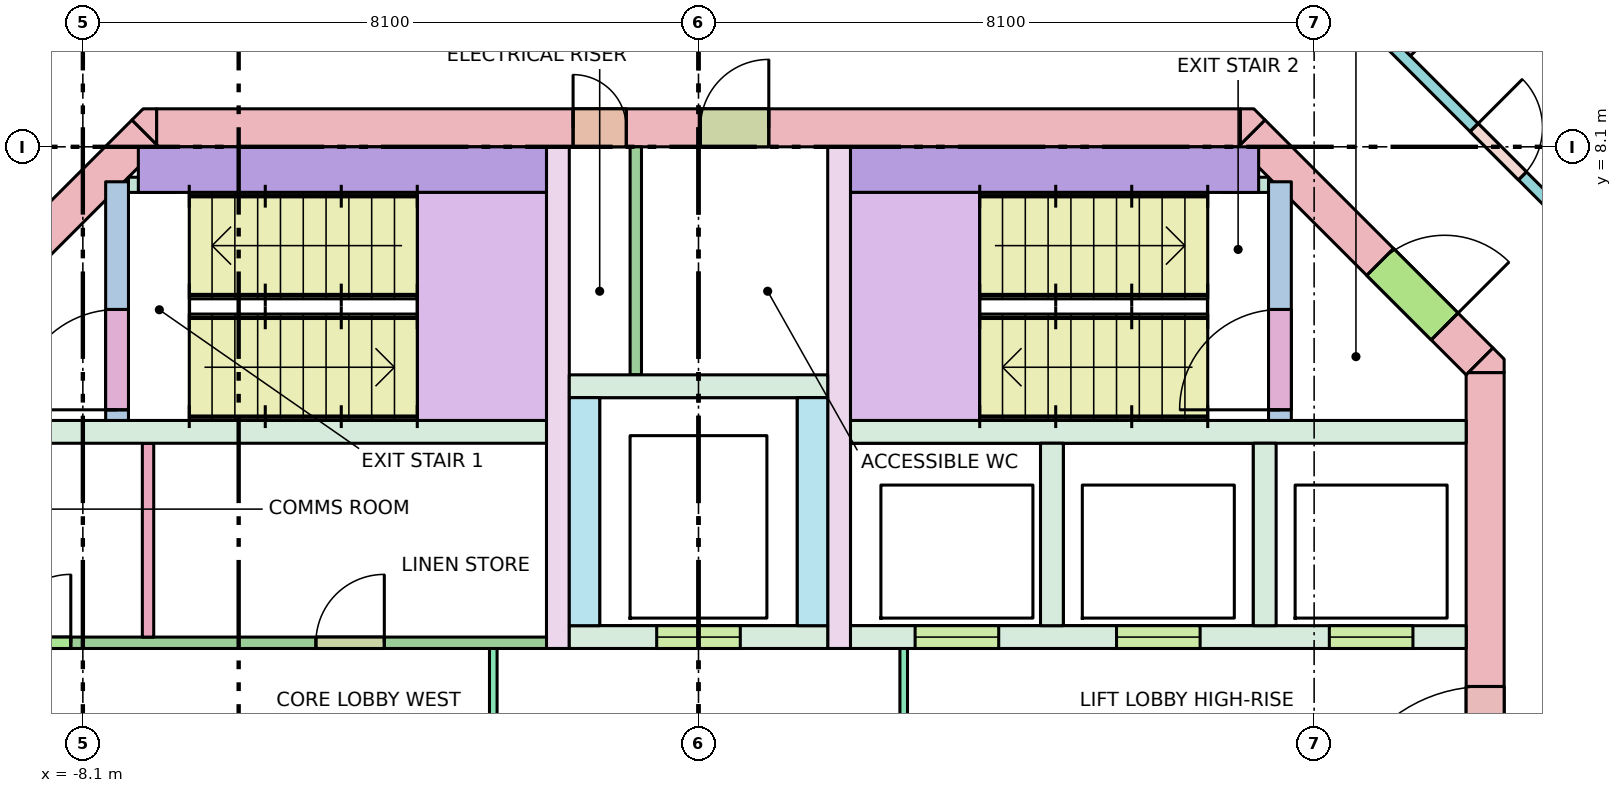
"""IFC4 building model, lengths in metres.
Left out: names, types, materials, properties, quantities, classifications, styles, units other than length and angle.
Written with IfcOpenShell. Run it as: python <this file> out.ifc"""

import sys

from ifc_helpers import new_model, si_unit, direction, frame, frame_2d, origin, place, context, subcontext, project, spatial, polyline, rectangle, outline, extrude, element, fill, save


model = new_model("IFC4")
c1 = context("Model", 3, precision=1e-05, world=origin(), true_north=direction((0.0, 1.0)))
c2 = subcontext(c1, "Body", "Model", "MODEL_VIEW")
j1 = project(units=[si_unit("LENGTHUNIT", "METRE"), si_unit("PLANEANGLEUNIT", "RADIAN")], contexts=[c1])
p1 = place(None, origin())
s1 = spatial("IfcSite", under=j1, at=p1, CompositionType="ELEMENT")
p2 = place(p1, origin())
s2 = spatial("IfcBuilding", under=s1, at=p2, CompositionType="ELEMENT")
p3 = place(p2, frame((0.0, 0.0, 264.9)))
s3 = spatial("IfcBuildingStorey", under=s2, at=p3, CompositionType="ELEMENT", Elevation=264.9)
p4 = place(p3, frame((-7.13, 8.35, -0.28), z_axis=(0.0, 0.0, 1.0), x_axis=(1.0, 0.0, 0.0)))
e1 = element("IfcWall", 1, at=p4, inside=s3, PredefinedType="SHEAR", context=c2, shape_type="SweptSolid", body=[
    extrude(rectangle(XDim=14.26, YDim=0.5, at=frame_2d((7.13, 0.0))), origin(), (0.0, 0.0, 1.0), 3.7),
])
p5 = place(p4, frame((5.48, 0.0, 0.28)))
e2 = element("IfcOpeningElement", 2, at=p5, cuts=e1, PredefinedType="OPENING", context=c2, shape_type="SweptSolid", body=[
    extrude(rectangle(XDim=0.7, YDim=2.1, at=frame_2d((0.35, 1.05))), frame((0.0, 0.26, 0.0), z_axis=(0.0, -1.0, 0.0), x_axis=(1.0, 0.0, 0.0)), (0.0, 0.0, 1.0), 0.52),
])
p6 = place(p4, frame((7.155, 0.0, 0.28)))
e3 = element("IfcOpeningElement", 3, at=p6, cuts=e1, PredefinedType="OPENING", context=c2, shape_type="SweptSolid", body=[
    extrude(rectangle(XDim=0.9, YDim=2.1, at=frame_2d((0.45, 1.05))), frame((0.0, 0.26, 0.0), z_axis=(0.0, -1.0, 0.0), x_axis=(1.0, 0.0, 0.0)), (0.0, 0.0, 1.0), 0.52),
])
p7 = place(p3, frame((10.35, -5.13, -0.28), z_axis=(0.0, 0.0, 1.0), x_axis=(0.0, 1.0, 0.0)))
e4 = element("IfcWall", 4, at=p7, inside=s3, PredefinedType="SHEAR", context=c2, shape_type="SweptSolid", body=[
    extrude(rectangle(XDim=10.26, YDim=0.5, at=frame_2d((5.13, 0.0))), origin(), (0.0, 0.0, 1.0), 3.7),
])
p8 = place(p7, frame((4.13, 0.0, 0.28)))
e5 = element("IfcOpeningElement", 5, at=p8, cuts=e4, PredefinedType="OPENING", context=c2, shape_type="SweptSolid", body=[
    extrude(rectangle(XDim=2.0, YDim=2.1, at=frame_2d((1.0, 1.05))), frame((0.0, 0.26, 0.0), z_axis=(0.0, -1.0, 0.0), x_axis=(1.0, 0.0, 0.0)), (0.0, 0.0, 1.0), 0.52),
])
p9 = place(p3, frame((-10.277, 5.277, -0.28), z_axis=(0.0, 0.0, 1.0), x_axis=(0.707106781187, 0.707106781187, 0.0)))
e6 = element("IfcWall", 6, at=p9, inside=s3, PredefinedType="SHEAR", context=c2, shape_type="SweptSolid", body=[
    extrude(rectangle(XDim=4.243, YDim=0.5, at=frame_2d((2.121, 0.0))), origin(), (0.0, 0.0, 1.0), 3.7),
])
p10 = place(p9, frame((0.65, 0.0, 0.28)))
e7 = element("IfcOpeningElement", 7, at=p10, cuts=e6, PredefinedType="OPENING", context=c2, shape_type="SweptSolid", body=[
    extrude(rectangle(XDim=1.2, YDim=2.1, at=frame_2d((0.6, 1.05))), frame((0.0, 0.26, 0.0), z_axis=(0.0, -1.0, 0.0), x_axis=(1.0, 0.0, 0.0)), (0.0, 0.0, 1.0), 0.52),
])
p11 = place(p3, frame((7.277, 8.277, -0.28), z_axis=(0.0, 0.0, 1.0), x_axis=(0.707106781187, -0.707106781187, 0.0)))
e8 = element("IfcWall", 8, at=p11, inside=s3, PredefinedType="SHEAR", context=c2, shape_type="SweptSolid", body=[
    extrude(rectangle(XDim=4.243, YDim=0.5, at=frame_2d((2.121, 0.0))), origin(), (0.0, 0.0, 1.0), 3.7),
])
p12 = place(p11, frame((2.393, 0.0, 0.28)))
e9 = element("IfcOpeningElement", 9, at=p12, cuts=e8, PredefinedType="OPENING", context=c2, shape_type="SweptSolid", body=[
    extrude(rectangle(XDim=1.2, YDim=2.1, at=frame_2d((0.6, 1.05))), frame((0.0, 0.26, 0.0), z_axis=(0.0, -1.0, 0.0), x_axis=(1.0, 0.0, 0.0)), (0.0, 0.0, 1.0), 0.52),
])
p13 = place(p3, frame((0.0, 0.0, -0.28)))
e10 = element("IfcWall", 10, at=p13, inside=s3, PredefinedType="SHEAR", context=c2, shape_type="SweptSolid", body=[
    extrude(outline(polyline([(10.6, 5.307), (10.6, 5.13), (10.13, 5.13), (10.454, 5.454), (10.6, 5.307)])), origin(), (0.0, 0.0, 1.0), 3.7),
])
p14 = place(p3, frame((0.0, 0.0, -0.28)))
e11 = element("IfcWall", 11, at=p14, inside=s3, PredefinedType="SHEAR", context=c2, shape_type="SweptSolid", body=[
    extrude(outline(polyline([(-7.307, 8.6), (-7.13, 8.6), (-7.13, 8.13), (-7.454, 8.454), (-7.307, 8.6)])), origin(), (0.0, 0.0, 1.0), 3.7),
])
p15 = place(p3, frame((0.0, 0.0, -0.28)))
e12 = element("IfcWall", 12, at=p15, inside=s3, PredefinedType="SHEAR", context=c2, shape_type="SweptSolid", body=[
    extrude(outline(polyline([(7.307, 8.6), (7.454, 8.454), (7.13, 8.13), (7.13, 8.6), (7.307, 8.6)])), origin(), (0.0, 0.0, 1.0), 3.7),
])
for number, where, z_axis, x_axis in (
    (13, (-10.1, 4.35, 0.0), (0.0, 0.0, 1.0), (1.0, 0.0, 0.0)),
    (14, (2.0, 4.35, 0.0), (0.0, 0.0, 1.0), (1.0, 0.0, 0.0)),
):
    element("IfcWall", number, at=place(p3, frame(where, z_axis=z_axis, x_axis=x_axis)), inside=s3, PredefinedType="SOLIDWALL", context=c2, shape_type="SweptSolid", body=[
        extrude(rectangle(XDim=8.1, YDim=0.3, at=frame_2d((4.05, 0.0))), origin(), (0.0, 0.0, 1.0), 3.42),
    ])
p16 = place(p3, frame((2.0, 1.65, 0.0), z_axis=(0.0, 0.0, 1.0), x_axis=(1.0, 0.0, 0.0)))
e15 = element("IfcWall", 15, at=p16, inside=s3, PredefinedType="SOLIDWALL", context=c2, shape_type="SweptSolid", body=[
    extrude(rectangle(XDim=8.1, YDim=0.3, at=frame_2d((4.05, 0.0))), origin(), (0.0, 0.0, 1.0), 3.42),
])
p17 = place(p16, frame((0.85, 0.0, 0.0)))
e16 = element("IfcOpeningElement", 16, at=p17, cuts=e15, PredefinedType="OPENING", context=c2, shape_type="SweptSolid", body=[
    extrude(rectangle(XDim=1.1, YDim=2.1, at=frame_2d((0.55, 1.05))), frame((0.0, 0.16, 0.0), z_axis=(0.0, -1.0, 0.0), x_axis=(1.0, 0.0, 0.0)), (0.0, 0.0, 1.0), 0.32),
])
p18 = place(p16, frame((3.5, 0.0, 0.0)))
e17 = element("IfcOpeningElement", 17, at=p18, cuts=e15, PredefinedType="OPENING", context=c2, shape_type="SweptSolid", body=[
    extrude(rectangle(XDim=1.1, YDim=2.1, at=frame_2d((0.55, 1.05))), frame((0.0, 0.16, 0.0), z_axis=(0.0, -1.0, 0.0), x_axis=(1.0, 0.0, 0.0)), (0.0, 0.0, 1.0), 0.32),
])
p19 = place(p16, frame((6.3, 0.0, 0.0)))
e18 = element("IfcOpeningElement", 18, at=p19, cuts=e15, PredefinedType="OPENING", context=c2, shape_type="SweptSolid", body=[
    extrude(rectangle(XDim=1.1, YDim=2.1, at=frame_2d((0.55, 1.05))), frame((0.0, 0.16, 0.0), z_axis=(0.0, -1.0, 0.0), x_axis=(1.0, 0.0, 0.0)), (0.0, 0.0, 1.0), 0.32),
])
for number, where, z_axis, x_axis in (
    (19, (4.65, 1.8, 0.0), (0.0, 0.0, 1.0), (0.0, 1.0, 0.0)),
    (20, (7.45, 1.8, 0.0), (0.0, 0.0, 1.0), (0.0, 1.0, 0.0)),
):
    element("IfcWall", number, at=place(p3, frame(where, z_axis=z_axis, x_axis=x_axis)), inside=s3, PredefinedType="SOLIDWALL", context=c2, shape_type="SweptSolid", body=[
        extrude(rectangle(XDim=2.4, YDim=0.3, at=frame_2d((1.2, 0.0))), origin(), (0.0, 0.0, 1.0), 3.42),
    ])
for number, where, z_axis, x_axis in (
    (21, (-1.85, 1.5, 0.0), (0.0, 0.0, 1.0), (0.0, 1.0, 0.0)),
    (22, (1.85, 1.5, 0.0), (0.0, 0.0, 1.0), (0.0, 1.0, 0.0)),
):
    element("IfcWall", number, at=place(p3, frame(where, z_axis=z_axis, x_axis=x_axis)), inside=s3, PredefinedType="SHEAR", context=c2, shape_type="SweptSolid", body=[
        extrude(rectangle(XDim=6.6, YDim=0.3, at=frame_2d((3.3, 0.0))), origin(), (0.0, 0.0, 1.0), 3.42),
    ])
p20 = place(p3, frame((-1.7, 1.65, 0.0), z_axis=(0.0, 0.0, 1.0), x_axis=(1.0, 0.0, 0.0)))
e23 = element("IfcWall", 23, at=p20, inside=s3, PredefinedType="SOLIDWALL", context=c2, shape_type="SweptSolid", body=[
    extrude(rectangle(XDim=3.4, YDim=0.3, at=frame_2d((1.7, 0.0))), origin(), (0.0, 0.0, 1.0), 3.42),
])
p21 = place(p20, frame((1.15, 0.0, 0.0)))
e24 = element("IfcOpeningElement", 24, at=p21, cuts=e23, PredefinedType="OPENING", context=c2, shape_type="SweptSolid", body=[
    extrude(rectangle(XDim=1.1, YDim=2.1, at=frame_2d((0.55, 1.05))), frame((0.0, 0.16, 0.0), z_axis=(0.0, -1.0, 0.0), x_axis=(1.0, 0.0, 0.0)), (0.0, 0.0, 1.0), 0.32),
])
for number, where, z_axis, x_axis in (
    (25, (-1.5, 1.8, 0.0), (0.0, 0.0, 1.0), (0.0, 1.0, 0.0)),
    (26, (1.5, 1.8, 0.0), (0.0, 0.0, 1.0), (0.0, 1.0, 0.0)),
):
    element("IfcWall", number, at=place(p3, frame(where, z_axis=z_axis, x_axis=x_axis)), inside=s3, PredefinedType="SOLIDWALL", context=c2, shape_type="SweptSolid", body=[
        extrude(rectangle(XDim=3.0, YDim=0.4, at=frame_2d((1.5, 0.0))), origin(), (0.0, 0.0, 1.0), 3.42),
    ])
p22 = place(p3, frame((-1.7, 4.95, 0.0), z_axis=(0.0, 0.0, 1.0), x_axis=(1.0, 0.0, 0.0)))
e27 = element("IfcWall", 27, at=p22, inside=s3, PredefinedType="SOLIDWALL", context=c2, shape_type="SweptSolid", body=[
    extrude(rectangle(XDim=3.4, YDim=0.3, at=frame_2d((1.7, 0.0))), origin(), (0.0, 0.0, 1.0), 3.42),
])
p23 = place(p3, frame((-7.65, 4.5, 0.0), z_axis=(0.0, 0.0, 1.0), x_axis=(0.0, 1.0, 0.0)))
e28 = element("IfcWall", 28, at=p23, inside=s3, PredefinedType="SHEAR", context=c2, shape_type="SweptSolid", body=[
    extrude(rectangle(XDim=3.14, YDim=0.3, at=frame_2d((1.57, 0.0))), origin(), (0.0, 0.0, 1.0), 3.42),
])
p24 = place(p23, frame((0.14, 0.0, 0.0)))
e29 = element("IfcOpeningElement", 29, at=p24, cuts=e28, PredefinedType="OPENING", context=c2, shape_type="SweptSolid", body=[
    extrude(rectangle(XDim=1.32, YDim=2.1, at=frame_2d((0.66, 1.05))), frame((0.0, 0.16, 0.0), z_axis=(0.0, -1.0, 0.0), x_axis=(1.0, 0.0, 0.0)), (0.0, 0.0, 1.0), 0.32),
])
p25 = place(p3, frame((-7.37, 7.8, 0.0), z_axis=(0.0, 0.0, 1.0), x_axis=(1.0, 0.0, 0.0)))
e30 = element("IfcWall", 30, at=p25, inside=s3, PredefinedType="SHEAR", context=c2, shape_type="SweptSolid", body=[
    extrude(rectangle(XDim=5.37, YDim=0.6, at=frame_2d((2.685, 0.0))), origin(), (0.0, 0.0, 1.0), 3.42),
])
p26 = place(p3, frame((7.65, 4.5, 0.0), z_axis=(0.0, 0.0, 1.0), x_axis=(0.0, 1.0, 0.0)))
e31 = element("IfcWall", 31, at=p26, inside=s3, PredefinedType="SHEAR", context=c2, shape_type="SweptSolid", body=[
    extrude(rectangle(XDim=3.14, YDim=0.3, at=frame_2d((1.57, 0.0))), origin(), (0.0, 0.0, 1.0), 3.42),
])
p27 = place(p26, frame((0.14, 0.0, 0.0)))
e32 = element("IfcOpeningElement", 32, at=p27, cuts=e31, PredefinedType="OPENING", context=c2, shape_type="SweptSolid", body=[
    extrude(rectangle(XDim=1.32, YDim=2.1, at=frame_2d((0.66, 1.05))), frame((0.0, 0.16, 0.0), z_axis=(0.0, -1.0, 0.0), x_axis=(1.0, 0.0, 0.0)), (0.0, 0.0, 1.0), 0.32),
])
p28 = place(p3, frame((2.0, 7.8, 0.0), z_axis=(0.0, 0.0, 1.0), x_axis=(1.0, 0.0, 0.0)))
e33 = element("IfcWall", 33, at=p28, inside=s3, PredefinedType="SHEAR", context=c2, shape_type="SweptSolid", body=[
    extrude(rectangle(XDim=5.37, YDim=0.6, at=frame_2d((2.685, 0.0))), origin(), (0.0, 0.0, 1.0), 3.42),
])
for number, where, z_axis, x_axis in (
    (34, (-7.5, 7.6, 0.0), (0.0, 0.0, 1.0), (1.0, 0.0, 0.0)),
    (35, (6.9, 7.6, 0.0), (0.0, 0.0, 1.0), (1.0, 0.0, 0.0)),
):
    element("IfcWall", number, at=place(p3, frame(where, z_axis=z_axis, x_axis=x_axis)), inside=s3, PredefinedType="SHEAR", context=c2, shape_type="SweptSolid", body=[
        extrude(rectangle(XDim=0.6, YDim=0.2, at=frame_2d((0.3, 0.0))), origin(), (0.0, 0.0, 1.0), 3.42),
    ])
p29 = place(p3, frame((-2.7, -1.5, 0.0), z_axis=(0.0, 0.0, 1.0), x_axis=(0.0, 1.0, 0.0)))
e36 = element("IfcWall", 36, at=p29, inside=s3, PredefinedType="PARTITIONING", context=c2, shape_type="SweptSolid", body=[
    extrude(rectangle(XDim=3.0, YDim=0.1, at=frame_2d((1.5, 0.0))), origin(), (0.0, 0.0, 1.0), 3.42),
])
p30 = place(p29, frame((0.9, 0.0, 0.0)))
e37 = element("IfcOpeningElement", 37, at=p30, cuts=e36, PredefinedType="OPENING", context=c2, shape_type="SweptSolid", body=[
    extrude(rectangle(XDim=1.2, YDim=2.1, at=frame_2d((0.6, 1.05))), frame((0.0, 0.06, 0.0), z_axis=(0.0, -1.0, 0.0), x_axis=(1.0, 0.0, 0.0)), (0.0, 0.0, 1.0), 0.12),
])
p31 = place(p3, frame((2.7, -1.5, 0.0), z_axis=(0.0, 0.0, 1.0), x_axis=(0.0, 1.0, 0.0)))
e38 = element("IfcWall", 38, at=p31, inside=s3, PredefinedType="PARTITIONING", context=c2, shape_type="SweptSolid", body=[
    extrude(rectangle(XDim=3.0, YDim=0.1, at=frame_2d((1.5, 0.0))), origin(), (0.0, 0.0, 1.0), 3.42),
])
p32 = place(p31, frame((0.9, 0.0, 0.0)))
e39 = element("IfcOpeningElement", 39, at=p32, cuts=e38, PredefinedType="OPENING", context=c2, shape_type="SweptSolid", body=[
    extrude(rectangle(XDim=1.2, YDim=2.1, at=frame_2d((0.6, 1.05))), frame((0.0, 0.06, 0.0), z_axis=(0.0, -1.0, 0.0), x_axis=(1.0, 0.0, 0.0)), (0.0, 0.0, 1.0), 0.12),
])
p33 = place(p3, frame((-0.825, 5.1, 0.0), z_axis=(0.0, 0.0, 1.0), x_axis=(0.0, 1.0, 0.0)))
e40 = element("IfcWall", 40, at=p33, inside=s3, PredefinedType="PARTITIONING", context=c2, shape_type="SweptSolid", body=[
    extrude(rectangle(XDim=3.0, YDim=0.15, at=frame_2d((1.5, 0.0))), origin(), (0.0, 0.0, 1.0), 3.42),
])
p34 = place(p3, frame((-7.242, 1.65, 0.0), z_axis=(0.0, 0.0, 1.0), x_axis=(0.0, 1.0, 0.0)))
e41 = element("IfcWall", 41, at=p34, inside=s3, PredefinedType="PARTITIONING", context=c2, shape_type="SweptSolid", body=[
    extrude(rectangle(XDim=2.55, YDim=0.15, at=frame_2d((1.275, 0.0))), origin(), (0.0, 0.0, 1.0), 3.42),
])
p35 = place(p3, frame((-10.1, 1.575, 0.0), z_axis=(0.0, 0.0, 1.0), x_axis=(1.0, 0.0, 0.0)))
e42 = element("IfcWall", 42, at=p35, inside=s3, PredefinedType="PARTITIONING", context=c2, shape_type="SweptSolid", body=[
    extrude(rectangle(XDim=8.1, YDim=0.15, at=frame_2d((4.05, 0.0))), origin(), (0.0, 0.0, 1.0), 3.42),
])
p36 = place(p35, frame((0.941, 0.0, 0.0)))
e43 = element("IfcOpeningElement", 43, at=p36, cuts=e42, PredefinedType="OPENING", context=c2, shape_type="SweptSolid", body=[
    extrude(rectangle(XDim=0.9, YDim=2.1, at=frame_2d((0.45, 1.05))), frame((0.0, 0.085, 0.0), z_axis=(0.0, -1.0, 0.0), x_axis=(1.0, 0.0, 0.0)), (0.0, 0.0, 1.0), 0.17),
])
p37 = place(p35, frame((5.066, 0.0, 0.0)))
e44 = element("IfcOpeningElement", 44, at=p37, cuts=e42, PredefinedType="OPENING", context=c2, shape_type="SweptSolid", body=[
    extrude(rectangle(XDim=0.9, YDim=2.1, at=frame_2d((0.45, 1.05))), frame((0.0, 0.085, 0.0), z_axis=(0.0, -1.0, 0.0), x_axis=(1.0, 0.0, 0.0)), (0.0, 0.0, 1.0), 0.17),
])
p38 = place(p3, frame((-12.438, 6.121, 0.0), z_axis=(0.0, 0.0, 1.0), x_axis=(0.707106781187, 0.707106781187, 0.0)))
e45 = element("IfcWall", 45, at=p38, inside=s3, PredefinedType="PARTITIONING", context=c2, shape_type="SweptSolid", body=[
    extrude(rectangle(XDim=6.105, YDim=0.15, at=frame_2d((3.053, 0.0))), origin(), (0.0, 0.0, 1.0), 2.57),
])
p39 = place(p38, frame((2.602, 0.0, 0.0)))
e46 = element("IfcOpeningElement", 46, at=p39, cuts=e45, PredefinedType="OPENING", context=c2, shape_type="SweptSolid", body=[
    extrude(rectangle(XDim=1.8, YDim=2.1, at=frame_2d((0.9, 1.05))), frame((0.0, 0.085, 0.0), z_axis=(0.0, -1.0, 0.0), x_axis=(1.0, 0.0, 0.0)), (0.0, 0.0, 1.0), 0.17),
])
p40 = place(p3, frame((8.121, 10.438, 0.0), z_axis=(0.0, 0.0, 1.0), x_axis=(0.707106781187, -0.707106781187, 0.0)))
e47 = element("IfcWall", 47, at=p40, inside=s3, PredefinedType="PARTITIONING", context=c2, shape_type="SweptSolid", body=[
    extrude(rectangle(XDim=6.105, YDim=0.15, at=frame_2d((3.053, 0.0))), origin(), (0.0, 0.0, 1.0), 2.57),
])
p41 = place(p40, frame((2.948, 0.0, 0.0)))
e48 = element("IfcOpeningElement", 48, at=p41, cuts=e47, PredefinedType="OPENING", context=c2, shape_type="SweptSolid", body=[
    extrude(rectangle(XDim=0.9, YDim=2.1, at=frame_2d((0.45, 1.05))), frame((0.0, 0.085, 0.0), z_axis=(0.0, -1.0, 0.0), x_axis=(1.0, 0.0, 0.0)), (0.0, 0.0, 1.0), 0.17),
])
p42 = place(p3, frame((9.333, 9.333, 0.0), z_axis=(0.0, 0.0, 1.0), x_axis=(0.707106781187, 0.707106781187, 0.0)))
e49 = element("IfcWall", 49, at=p42, inside=s3, PredefinedType="PARTITIONING", context=c2, shape_type="SweptSolid", body=[
    extrude(rectangle(XDim=7.639, YDim=0.1, at=frame_2d((3.819, 0.0))), origin(), (0.0, 0.0, 1.0), 2.57),
])
p43 = place(p17, origin())
e50 = element("IfcDoor", 50, at=p43, inside=s3, OperationType="DOUBLE_DOOR_SLIDING", PredefinedType="DOOR", context=c2, shape_type="SweptSolid", body=[
    extrude(rectangle(XDim=1.1, YDim=2.1, at=frame_2d((0.55, 1.05))), frame((0.0, 0.025, 0.0), z_axis=(0.0, -1.0, 0.0), x_axis=(1.0, 0.0, 0.0)), (0.0, 0.0, 1.0), 0.05),
])
fill(e16, e50)
p44 = place(p18, origin())
e51 = element("IfcDoor", 51, at=p44, inside=s3, OperationType="DOUBLE_DOOR_SLIDING", PredefinedType="DOOR", context=c2, shape_type="SweptSolid", body=[
    extrude(rectangle(XDim=1.1, YDim=2.1, at=frame_2d((0.55, 1.05))), frame((0.0, 0.025, 0.0), z_axis=(0.0, -1.0, 0.0), x_axis=(1.0, 0.0, 0.0)), (0.0, 0.0, 1.0), 0.05),
])
fill(e17, e51)
p45 = place(p19, origin())
e52 = element("IfcDoor", 52, at=p45, inside=s3, OperationType="DOUBLE_DOOR_SLIDING", PredefinedType="DOOR", context=c2, shape_type="SweptSolid", body=[
    extrude(rectangle(XDim=1.1, YDim=2.1, at=frame_2d((0.55, 1.05))), frame((0.0, 0.025, 0.0), z_axis=(0.0, -1.0, 0.0), x_axis=(1.0, 0.0, 0.0)), (0.0, 0.0, 1.0), 0.05),
])
fill(e18, e52)
p46 = place(p21, origin())
e53 = element("IfcDoor", 53, at=p46, inside=s3, OperationType="DOUBLE_DOOR_SLIDING", PredefinedType="DOOR", context=c2, shape_type="SweptSolid", body=[
    extrude(rectangle(XDim=1.1, YDim=2.1, at=frame_2d((0.55, 1.05))), frame((0.0, 0.025, 0.0), z_axis=(0.0, -1.0, 0.0), x_axis=(1.0, 0.0, 0.0)), (0.0, 0.0, 1.0), 0.05),
])
fill(e24, e53)
p47 = place(p24, origin())
e54 = element("IfcDoor", 54, at=p47, inside=s3, OperationType="DOUBLE_DOOR_SINGLE_SWING", PredefinedType="DOOR", context=c2, shape_type="SweptSolid", body=[
    extrude(rectangle(XDim=1.32, YDim=2.1, at=frame_2d((0.66, 1.05))), frame((0.0, 0.025, 0.0), z_axis=(0.0, -1.0, 0.0), x_axis=(1.0, 0.0, 0.0)), (0.0, 0.0, 1.0), 0.05),
])
fill(e29, e54)
p48 = place(p27, origin())
e55 = element("IfcDoor", 55, at=p48, inside=s3, OperationType="DOUBLE_DOOR_SINGLE_SWING", PredefinedType="DOOR", context=c2, shape_type="SweptSolid", body=[
    extrude(rectangle(XDim=1.32, YDim=2.1, at=frame_2d((0.66, 1.05))), frame((0.0, 0.025, 0.0), z_axis=(0.0, -1.0, 0.0), x_axis=(1.0, 0.0, 0.0)), (0.0, 0.0, 1.0), 0.05),
])
fill(e32, e55)
p49 = place(p12, origin())
e56 = element("IfcDoor", 56, at=p49, inside=s3, OperationType="SINGLE_SWING_RIGHT", PredefinedType="DOOR", context=c2, shape_type="SweptSolid", body=[
    extrude(rectangle(XDim=1.2, YDim=2.1, at=frame_2d((0.6, 1.05))), frame((0.0, 0.025, 0.0), z_axis=(0.0, -1.0, 0.0), x_axis=(1.0, 0.0, 0.0)), (0.0, 0.0, 1.0), 0.05),
])
fill(e9, e56)
p50 = place(p8, origin())
e57 = element("IfcDoor", 57, at=p50, inside=s3, OperationType="DOUBLE_DOOR_SINGLE_SWING", PredefinedType="DOOR", context=c2, shape_type="SweptSolid", body=[
    extrude(rectangle(XDim=2.0, YDim=2.1, at=frame_2d((1.0, 1.05))), frame((0.0, 0.025, 0.0), z_axis=(0.0, -1.0, 0.0), x_axis=(1.0, 0.0, 0.0)), (0.0, 0.0, 1.0), 0.05),
])
fill(e5, e57)
p51 = place(p5, origin())
e58 = element("IfcDoor", 58, at=p51, inside=s3, OperationType="SINGLE_SWING_LEFT", PredefinedType="DOOR", context=c2, shape_type="SweptSolid", body=[
    extrude(rectangle(XDim=0.7, YDim=2.1, at=frame_2d((0.35, 1.05))), frame((0.0, 0.025, 0.0), z_axis=(0.0, -1.0, 0.0), x_axis=(1.0, 0.0, 0.0)), (0.0, 0.0, 1.0), 0.05),
])
fill(e2, e58)
p52 = place(p6, origin())
e59 = element("IfcDoor", 59, at=p52, inside=s3, OperationType="SINGLE_SWING_RIGHT", PredefinedType="DOOR", context=c2, shape_type="SweptSolid", body=[
    extrude(rectangle(XDim=0.9, YDim=2.1, at=frame_2d((0.45, 1.05))), frame((0.0, 0.025, 0.0), z_axis=(0.0, -1.0, 0.0), x_axis=(1.0, 0.0, 0.0)), (0.0, 0.0, 1.0), 0.05),
])
fill(e3, e59)
p53 = place(p36, origin())
e60 = element("IfcDoor", 60, at=p53, inside=s3, OperationType="SINGLE_SWING_RIGHT", PredefinedType="DOOR", context=c2, shape_type="SweptSolid", body=[
    extrude(rectangle(XDim=0.9, YDim=2.1, at=frame_2d((0.45, 1.05))), frame((0.0, 0.025, 0.0), z_axis=(0.0, -1.0, 0.0), x_axis=(1.0, 0.0, 0.0)), (0.0, 0.0, 1.0), 0.05),
])
fill(e43, e60)
p54 = place(p37, origin())
e61 = element("IfcDoor", 61, at=p54, inside=s3, OperationType="SINGLE_SWING_RIGHT", PredefinedType="DOOR", context=c2, shape_type="SweptSolid", body=[
    extrude(rectangle(XDim=0.9, YDim=2.1, at=frame_2d((0.45, 1.05))), frame((0.0, 0.025, 0.0), z_axis=(0.0, -1.0, 0.0), x_axis=(1.0, 0.0, 0.0)), (0.0, 0.0, 1.0), 0.05),
])
fill(e44, e61)
p55 = place(p41, origin())
e62 = element("IfcDoor", 62, at=p55, inside=s3, OperationType="SINGLE_SWING_LEFT", PredefinedType="DOOR", context=c2, shape_type="SweptSolid", body=[
    extrude(rectangle(XDim=0.9, YDim=2.1, at=frame_2d((0.45, 1.05))), frame((0.0, 0.025, 0.0), z_axis=(0.0, -1.0, 0.0), x_axis=(1.0, 0.0, 0.0)), (0.0, 0.0, 1.0), 0.05),
])
fill(e48, e62)
save(model, sys.argv[1])
